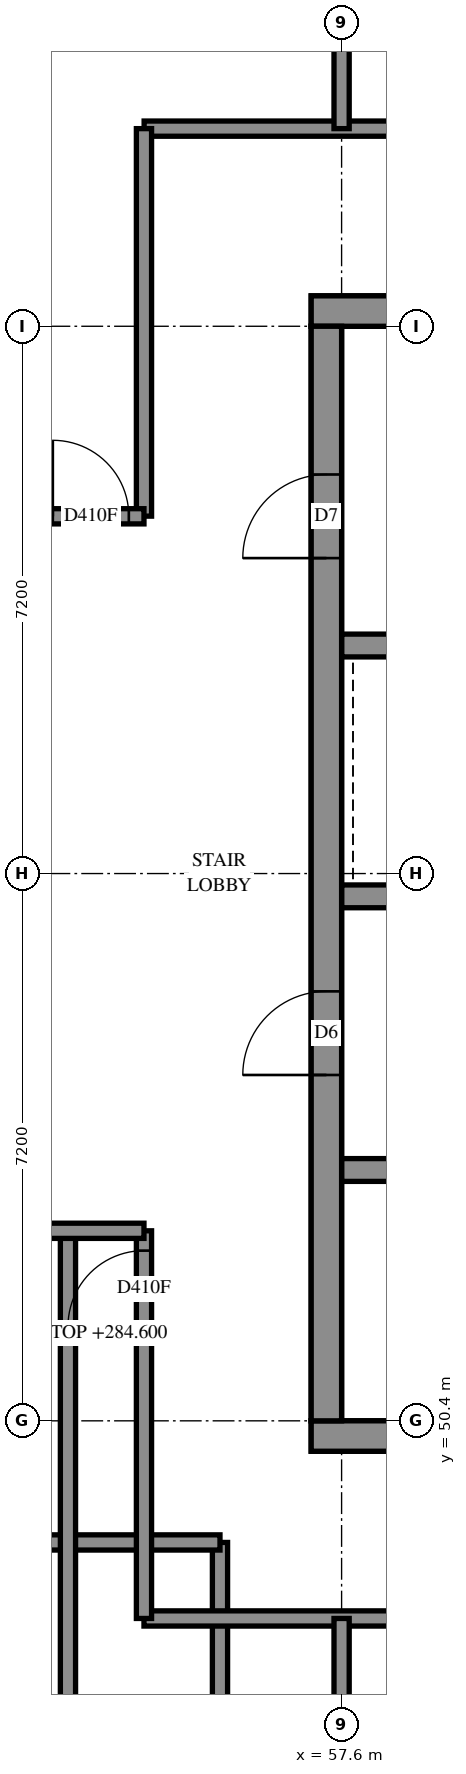
"""IFC4 building model, lengths in metres.
Left out: names, types, materials, properties, quantities, classifications, styles, units other than length and angle.
Written with IfcOpenShell. Run it as: python <this file> out.ifc"""

import sys

from ifc_helpers import new_model, si_unit, direction, frame, frame_2d, origin, place, context, subcontext, project, spatial, polyline, rectangle, outline, extrude, element, fill, save


model = new_model("IFC4")
c1 = context("Model", 3, precision=1e-05, world=origin(), true_north=direction((0.0, 1.0)))
c2 = subcontext(c1, "Body", "Model", "MODEL_VIEW")
j1 = project(units=[si_unit("LENGTHUNIT", "METRE"), si_unit("PLANEANGLEUNIT", "RADIAN")], contexts=[c1])
p1 = place(None, origin())
s1 = spatial("IfcSite", under=j1, at=p1, CompositionType="ELEMENT")
p2 = place(p1, origin())
s2 = spatial("IfcBuilding", under=s1, at=p2, CompositionType="ELEMENT")
p3 = place(p2, frame((0.0, 0.0, 284.6)))
s3 = spatial("IfcBuildingStorey", under=s2, at=p3, CompositionType="ELEMENT", Elevation=284.6)
p4 = place(p3, frame((57.2, 50.2, -0.3), z_axis=(0.0, 0.0, 1.0), x_axis=(1.0, 0.0, 0.0)))
e1 = element("IfcWall", 1, at=p4, inside=s3, PredefinedType="SHEAR", context=c2, shape_type="SweptSolid", body=[
    extrude(rectangle(XDim=15.2, YDim=0.4, at=frame_2d((7.6, 0.0))), origin(), (0.0, 0.0, 1.0), 5.3),
])
p5 = place(p3, frame((57.2, 65.0, -0.3), z_axis=(0.0, 0.0, 1.0), x_axis=(1.0, 0.0, 0.0)))
e2 = element("IfcWall", 2, at=p5, inside=s3, PredefinedType="SHEAR", context=c2, shape_type="SweptSolid", body=[
    extrude(rectangle(XDim=15.2, YDim=0.4, at=frame_2d((7.6, 0.0))), origin(), (0.0, 0.0, 1.0), 5.3),
])
p6 = place(p5, frame((10.4, 0.0, 0.3)))
e3 = element("IfcOpeningElement", 3, at=p6, cuts=e2, PredefinedType="OPENING", context=c2, shape_type="SweptSolid", body=[
    extrude(rectangle(XDim=0.8, YDim=2.1, at=frame_2d((0.4, 1.05))), frame((0.0, 0.21, 0.0), z_axis=(0.0, -1.0, 0.0), x_axis=(1.0, 0.0, 0.0)), (0.0, 0.0, 1.0), 0.42),
])
p7 = place(p3, frame((57.4, 50.4, -0.3), z_axis=(0.0, 0.0, 1.0), x_axis=(0.0, 1.0, 0.0)))
e4 = element("IfcWall", 4, at=p7, inside=s3, PredefinedType="SHEAR", context=c2, shape_type="SweptSolid", body=[
    extrude(rectangle(XDim=14.4, YDim=0.4, at=frame_2d((7.2, 0.0))), origin(), (0.0, 0.0, 1.0), 5.3),
])
p8 = place(p7, frame((4.55, 0.0, 0.3)))
e5 = element("IfcOpeningElement", 5, at=p8, cuts=e4, PredefinedType="OPENING", context=c2, shape_type="SweptSolid", body=[
    extrude(rectangle(XDim=1.1, YDim=2.1, at=frame_2d((0.55, 1.05))), frame((0.0, 0.21, 0.0), z_axis=(0.0, -1.0, 0.0), x_axis=(1.0, 0.0, 0.0)), (0.0, 0.0, 1.0), 0.42),
])
p9 = place(p7, frame((11.35, 0.0, 0.3)))
e6 = element("IfcOpeningElement", 6, at=p9, cuts=e4, PredefinedType="OPENING", context=c2, shape_type="SweptSolid", body=[
    extrude(rectangle(XDim=1.1, YDim=2.1, at=frame_2d((0.55, 1.05))), frame((0.0, 0.21, 0.0), z_axis=(0.0, -1.0, 0.0), x_axis=(1.0, 0.0, 0.0)), (0.0, 0.0, 1.0), 0.42),
])
p10 = place(p3, frame((57.6, 53.7, 0.0), z_axis=(0.0, 0.0, 1.0), x_axis=(1.0, 0.0, 0.0)))
e7 = element("IfcWall", 7, at=p10, inside=s3, PredefinedType="SOLIDWALL", context=c2, shape_type="SweptSolid", body=[
    extrude(rectangle(XDim=14.4, YDim=0.3, at=frame_2d((7.2, 0.0))), origin(), (0.0, 0.0, 1.0), 5.7),
])
p11 = place(p10, frame((1.35, 0.0, 0.0)))
e8 = element("IfcOpeningElement", 8, at=p11, cuts=e7, PredefinedType="OPENING", context=c2, shape_type="SweptSolid", body=[
    extrude(rectangle(XDim=0.9, YDim=2.1, at=frame_2d((0.45, 1.05))), frame((0.0, 0.16, 0.0), z_axis=(0.0, -1.0, 0.0), x_axis=(1.0, 0.0, 0.0)), (0.0, 0.0, 1.0), 0.32),
])
p12 = place(p10, frame((4.95, 0.0, 0.0)))
e9 = element("IfcOpeningElement", 9, at=p12, cuts=e7, PredefinedType="OPENING", context=c2, shape_type="SweptSolid", body=[
    extrude(rectangle(XDim=0.9, YDim=2.1, at=frame_2d((0.45, 1.05))), frame((0.0, 0.16, 0.0), z_axis=(0.0, -1.0, 0.0), x_axis=(1.0, 0.0, 0.0)), (0.0, 0.0, 1.0), 0.32),
])
p13 = place(p10, frame((8.55, 0.0, 0.0)))
e10 = element("IfcOpeningElement", 10, at=p13, cuts=e7, PredefinedType="OPENING", context=c2, shape_type="SweptSolid", body=[
    extrude(rectangle(XDim=0.9, YDim=2.1, at=frame_2d((0.45, 1.05))), frame((0.0, 0.16, 0.0), z_axis=(0.0, -1.0, 0.0), x_axis=(1.0, 0.0, 0.0)), (0.0, 0.0, 1.0), 0.32),
])
p14 = place(p10, frame((12.05, 0.0, 0.0)))
e11 = element("IfcOpeningElement", 11, at=p14, cuts=e7, PredefinedType="OPENING", context=c2, shape_type="SweptSolid", body=[
    extrude(rectangle(XDim=1.1, YDim=2.1, at=frame_2d((0.55, 1.05))), frame((0.0, 0.16, 0.0), z_axis=(0.0, -1.0, 0.0), x_axis=(1.0, 0.0, 0.0)), (0.0, 0.0, 1.0), 0.32),
])
p15 = place(p3, frame((57.6, 57.3, 0.0), z_axis=(0.0, 0.0, 1.0), x_axis=(1.0, 0.0, 0.0)))
e12 = element("IfcWall", 12, at=p15, inside=s3, PredefinedType="SOLIDWALL", context=c2, shape_type="SweptSolid", body=[
    extrude(rectangle(XDim=14.4, YDim=0.3, at=frame_2d((7.2, 0.0))), origin(), (0.0, 0.0, 1.0), 5.7),
])
p16 = place(p15, frame((8.55, 0.0, 0.0)))
e13 = element("IfcOpeningElement", 13, at=p16, cuts=e12, PredefinedType="OPENING", context=c2, shape_type="SweptSolid", body=[
    extrude(rectangle(XDim=0.9, YDim=2.1, at=frame_2d((0.45, 1.05))), frame((0.0, 0.16, 0.0), z_axis=(0.0, -1.0, 0.0), x_axis=(1.0, 0.0, 0.0)), (0.0, 0.0, 1.0), 0.32),
])
p17 = place(p15, frame((12.05, 0.0, 0.0)))
e14 = element("IfcOpeningElement", 14, at=p17, cuts=e12, PredefinedType="OPENING", context=c2, shape_type="SweptSolid", body=[
    extrude(rectangle(XDim=1.1, YDim=2.1, at=frame_2d((0.55, 1.05))), frame((0.0, 0.16, 0.0), z_axis=(0.0, -1.0, 0.0), x_axis=(1.0, 0.0, 0.0)), (0.0, 0.0, 1.0), 0.32),
])
p18 = place(p3, frame((57.6, 60.6, 0.0), z_axis=(0.0, 0.0, 1.0), x_axis=(1.0, 0.0, 0.0)))
e15 = element("IfcWall", 15, at=p18, inside=s3, PredefinedType="SOLIDWALL", context=c2, shape_type="SweptSolid", body=[
    extrude(rectangle(XDim=7.2, YDim=0.3, at=frame_2d((3.6, 0.0))), origin(), (0.0, 0.0, 1.0), 5.7),
])
p19 = place(p3, frame((56.0, 42.1, 0.0), z_axis=(0.0, 0.0, 1.0), x_axis=(0.0, 1.0, 0.0)))
e16 = element("IfcWall", 16, at=p19, inside=s3, PredefinedType="PARAPET", context=c2, shape_type="SweptSolid", body=[
    extrude(outline(polyline([(0.0, -0.1), (6.8, -0.1), (6.6, 0.1), (0.0, 0.1), (0.0, -0.1)])), origin(), (0.0, 0.0, 1.0), 0.25),
])
p20 = place(p3, frame((56.0, 48.8, 0.0), z_axis=(0.0, 0.0, 1.0), x_axis=(-1.0, 0.0, 0.0)))
e17 = element("IfcWall", 17, at=p20, inside=s3, PredefinedType="PARAPET", context=c2, shape_type="SweptSolid", body=[
    extrude(outline(polyline([(-0.1, -0.1), (6.7, -0.1), (6.7, 0.1), (0.1, 0.1), (-0.1, -0.1)])), origin(), (0.0, 0.0, 1.0), 0.25),
])
p21 = place(p3, frame((55.002, 67.4, 0.0), z_axis=(0.0, 0.0, 1.0), x_axis=(1.0, 0.0, 0.0)))
e18 = element("IfcWall", 18, at=p21, inside=s3, PredefinedType="PARTITIONING", context=c2, shape_type="SweptSolid", body=[
    extrude(rectangle(XDim=19.598, YDim=0.2, at=frame_2d((9.799, 0.0))), origin(), (0.0, 0.0, 1.0), 5.7),
])
p22 = place(p21, frame((8.282, 0.0, 0.0)))
e19 = element("IfcOpeningElement", 19, at=p22, cuts=e18, PredefinedType="OPENING", context=c2, shape_type="SweptSolid", body=[
    extrude(rectangle(XDim=1.0, YDim=2.1, at=frame_2d((0.5, 1.05))), frame((0.0, 0.11, 0.0), z_axis=(0.0, -1.0, 0.0), x_axis=(1.0, 0.0, 0.0)), (0.0, 0.0, 1.0), 0.22),
])
p23 = place(p21, frame((13.923, 0.0, 0.0)))
e20 = element("IfcOpeningElement", 20, at=p23, cuts=e18, PredefinedType="OPENING", context=c2, shape_type="SweptSolid", body=[
    extrude(rectangle(XDim=1.0, YDim=2.1, at=frame_2d((0.5, 1.05))), frame((0.0, 0.11, 0.0), z_axis=(0.0, -1.0, 0.0), x_axis=(1.0, 0.0, 0.0)), (0.0, 0.0, 1.0), 0.22),
])
p24 = place(p3, frame((55.0, 47.8, 0.0), z_axis=(0.0, 0.0, 1.0), x_axis=(1.0, 0.0, 0.0)))
e21 = element("IfcWall", 21, at=p24, inside=s3, PredefinedType="PARTITIONING", context=c2, shape_type="SweptSolid", body=[
    extrude(rectangle(XDim=19.266, YDim=0.2, at=frame_2d((9.633, 0.0))), origin(), (0.0, 0.0, 1.0), 5.7),
])
p25 = place(p24, frame((4.633, 0.0, 0.0)))
e22 = element("IfcOpeningElement", 22, at=p25, cuts=e21, PredefinedType="OPENING", context=c2, shape_type="SweptSolid", body=[
    extrude(rectangle(XDim=1.0, YDim=2.1, at=frame_2d((0.5, 1.05))), frame((0.0, 0.11, 0.0), z_axis=(0.0, -1.0, 0.0), x_axis=(1.0, 0.0, 0.0)), (0.0, 0.0, 1.0), 0.22),
])
p26 = place(p24, frame((6.707, 0.0, 0.0)))
e23 = element("IfcOpeningElement", 23, at=p26, cuts=e21, PredefinedType="OPENING", context=c2, shape_type="SweptSolid", body=[
    extrude(rectangle(XDim=1.0, YDim=2.1, at=frame_2d((0.5, 1.05))), frame((0.0, 0.11, 0.0), z_axis=(0.0, -1.0, 0.0), x_axis=(1.0, 0.0, 0.0)), (0.0, 0.0, 1.0), 0.22),
])
p27 = place(p24, frame((11.832, 0.0, 0.0)))
e24 = element("IfcOpeningElement", 24, at=p27, cuts=e21, PredefinedType="OPENING", context=c2, shape_type="SweptSolid", body=[
    extrude(rectangle(XDim=1.0, YDim=2.1, at=frame_2d((0.5, 1.05))), frame((0.0, 0.11, 0.0), z_axis=(0.0, -1.0, 0.0), x_axis=(1.0, 0.0, 0.0)), (0.0, 0.0, 1.0), 0.22),
])
p28 = place(p24, frame((13.908, 0.0, 0.0)))
e25 = element("IfcOpeningElement", 25, at=p28, cuts=e21, PredefinedType="OPENING", context=c2, shape_type="SweptSolid", body=[
    extrude(rectangle(XDim=1.0, YDim=2.1, at=frame_2d((0.5, 1.05))), frame((0.0, 0.11, 0.0), z_axis=(0.0, -1.0, 0.0), x_axis=(1.0, 0.0, 0.0)), (0.0, 0.0, 1.0), 0.22),
])
p29 = place(p3, frame((54.0, 42.13, 0.0), z_axis=(0.0, 0.0, 1.0), x_axis=(0.0, 1.0, 0.0)))
e26 = element("IfcWall", 26, at=p29, inside=s3, PredefinedType="PARTITIONING", context=c2, shape_type="SweptSolid", body=[
    extrude(rectangle(XDim=10.77, YDim=0.2, at=frame_2d((5.385, 0.0))), origin(), (0.0, 0.0, 1.0), 5.7),
])
p30 = place(p3, frame((55.0, 47.8, 0.0), z_axis=(0.0, 0.0, 1.0), x_axis=(0.0, 1.0, 0.0)))
e27 = element("IfcWall", 27, at=p30, inside=s3, PredefinedType="PARTITIONING", context=c2, shape_type="SweptSolid", body=[
    extrude(rectangle(XDim=5.1, YDim=0.2, at=frame_2d((2.55, 0.0))), origin(), (0.0, 0.0, 1.0), 5.7),
])
p31 = place(p30, frame((3.839, 0.0, 0.0)))
e28 = element("IfcOpeningElement", 28, at=p31, cuts=e27, PredefinedType="OPENING", context=c2, shape_type="SweptSolid", body=[
    extrude(rectangle(XDim=1.0, YDim=2.1, at=frame_2d((0.5, 1.05))), frame((0.0, 0.11, 0.0), z_axis=(0.0, -1.0, 0.0), x_axis=(1.0, 0.0, 0.0)), (0.0, 0.0, 1.0), 0.22),
])
p32 = place(p3, frame((55.0, 62.302, 0.0), z_axis=(0.0, 0.0, 1.0), x_axis=(0.0, 1.0, 0.0)))
e29 = element("IfcWall", 29, at=p32, inside=s3, PredefinedType="PARTITIONING", context=c2, shape_type="SweptSolid", body=[
    extrude(rectangle(XDim=5.098, YDim=0.2, at=frame_2d((2.549, 0.0))), origin(), (0.0, 0.0, 1.0), 5.7),
])
p33 = place(p3, frame((50.4, 52.9, 0.0), z_axis=(0.0, 0.0, 1.0), x_axis=(1.0, 0.0, 0.0)))
e30 = element("IfcWall", 30, at=p33, inside=s3, PredefinedType="PARTITIONING", context=c2, shape_type="SweptSolid", body=[
    extrude(rectangle(XDim=4.6, YDim=0.2, at=frame_2d((2.3, 0.0))), origin(), (0.0, 0.0, 1.0), 5.7),
])
p34 = place(p33, frame((2.033, 0.0, 0.0)))
e31 = element("IfcOpeningElement", 31, at=p34, cuts=e30, PredefinedType="OPENING", context=c2, shape_type="SweptSolid", body=[
    extrude(rectangle(XDim=1.0, YDim=2.1, at=frame_2d((0.5, 1.05))), frame((0.0, 0.11, 0.0), z_axis=(0.0, -1.0, 0.0), x_axis=(1.0, 0.0, 0.0)), (0.0, 0.0, 1.0), 0.22),
])
for number, where, z_axis, x_axis in (
    (32, (57.6, 42.85, 0.0), (0.0, 0.0, 1.0), (0.0, 1.0, 0.0)),
    (33, (57.6, 67.4, 0.0), (0.0, 0.0, 1.0), (0.0, 1.0, 0.0)),
):
    element("IfcWall", number, at=place(p3, frame(where, z_axis=z_axis, x_axis=x_axis)), inside=s3, PredefinedType="PARTITIONING", context=c2, shape_type="SweptSolid", body=[
        extrude(rectangle(XDim=4.95, YDim=0.2, at=frame_2d((2.475, 0.0))), origin(), (0.0, 0.0, 1.0), 5.7),
    ])
p35 = place(p3, frame((52.502, 62.3, 0.0), z_axis=(0.0, 0.0, 1.0), x_axis=(1.0, 0.0, 0.0)))
e34 = element("IfcWall", 34, at=p35, inside=s3, PredefinedType="PARTITIONING", context=c2, shape_type="SweptSolid", body=[
    extrude(rectangle(XDim=2.498, YDim=0.2, at=frame_2d((1.249, 0.0))), origin(), (0.0, 0.0, 1.0), 5.7),
])
p36 = place(p35, frame((1.299, 0.0, 0.0)))
e35 = element("IfcOpeningElement", 35, at=p36, cuts=e34, PredefinedType="OPENING", context=c2, shape_type="SweptSolid", body=[
    extrude(rectangle(XDim=1.0, YDim=2.1, at=frame_2d((0.5, 1.05))), frame((0.0, 0.11, 0.0), z_axis=(0.0, -1.0, 0.0), x_axis=(1.0, 0.0, 0.0)), (0.0, 0.0, 1.0), 0.22),
])
p37 = place(p8, origin())
e36 = element("IfcDoor", 36, at=p37, inside=s3, OperationType="DOUBLE_DOOR_SINGLE_SWING", PredefinedType="DOOR", context=c2, shape_type="SweptSolid", body=[
    extrude(rectangle(XDim=1.1, YDim=2.1, at=frame_2d((0.55, 1.05))), frame((0.0, 0.025, 0.0), z_axis=(0.0, -1.0, 0.0), x_axis=(1.0, 0.0, 0.0)), (0.0, 0.0, 1.0), 0.05),
])
fill(e5, e36)
p38 = place(p9, origin())
e37 = element("IfcDoor", 37, at=p38, inside=s3, OperationType="SINGLE_SWING_LEFT", PredefinedType="DOOR", context=c2, shape_type="SweptSolid", body=[
    extrude(rectangle(XDim=1.1, YDim=2.1, at=frame_2d((0.55, 1.05))), frame((0.0, 0.025, 0.0), z_axis=(0.0, -1.0, 0.0), x_axis=(1.0, 0.0, 0.0)), (0.0, 0.0, 1.0), 0.05),
])
fill(e6, e37)
p39 = place(p36, origin())
e38 = element("IfcDoor", 38, at=p39, inside=s3, OperationType="SINGLE_SWING_RIGHT", PredefinedType="DOOR", context=c2, shape_type="SweptSolid", body=[
    extrude(rectangle(XDim=1.0, YDim=2.1, at=frame_2d((0.5, 1.05))), frame((0.0, 0.025, 0.0), z_axis=(0.0, -1.0, 0.0), x_axis=(1.0, 0.0, 0.0)), (0.0, 0.0, 1.0), 0.05),
])
fill(e35, e38)
p40 = place(p31, origin())
e39 = element("IfcDoor", 39, at=p40, inside=s3, OperationType="SINGLE_SWING_RIGHT", PredefinedType="DOOR", context=c2, shape_type="SweptSolid", body=[
    extrude(rectangle(XDim=1.0, YDim=2.1, at=frame_2d((0.5, 1.05))), frame((0.0, 0.025, 0.0), z_axis=(0.0, -1.0, 0.0), x_axis=(1.0, 0.0, 0.0)), (0.0, 0.0, 1.0), 0.05),
])
fill(e28, e39)
save(model, sys.argv[1])
